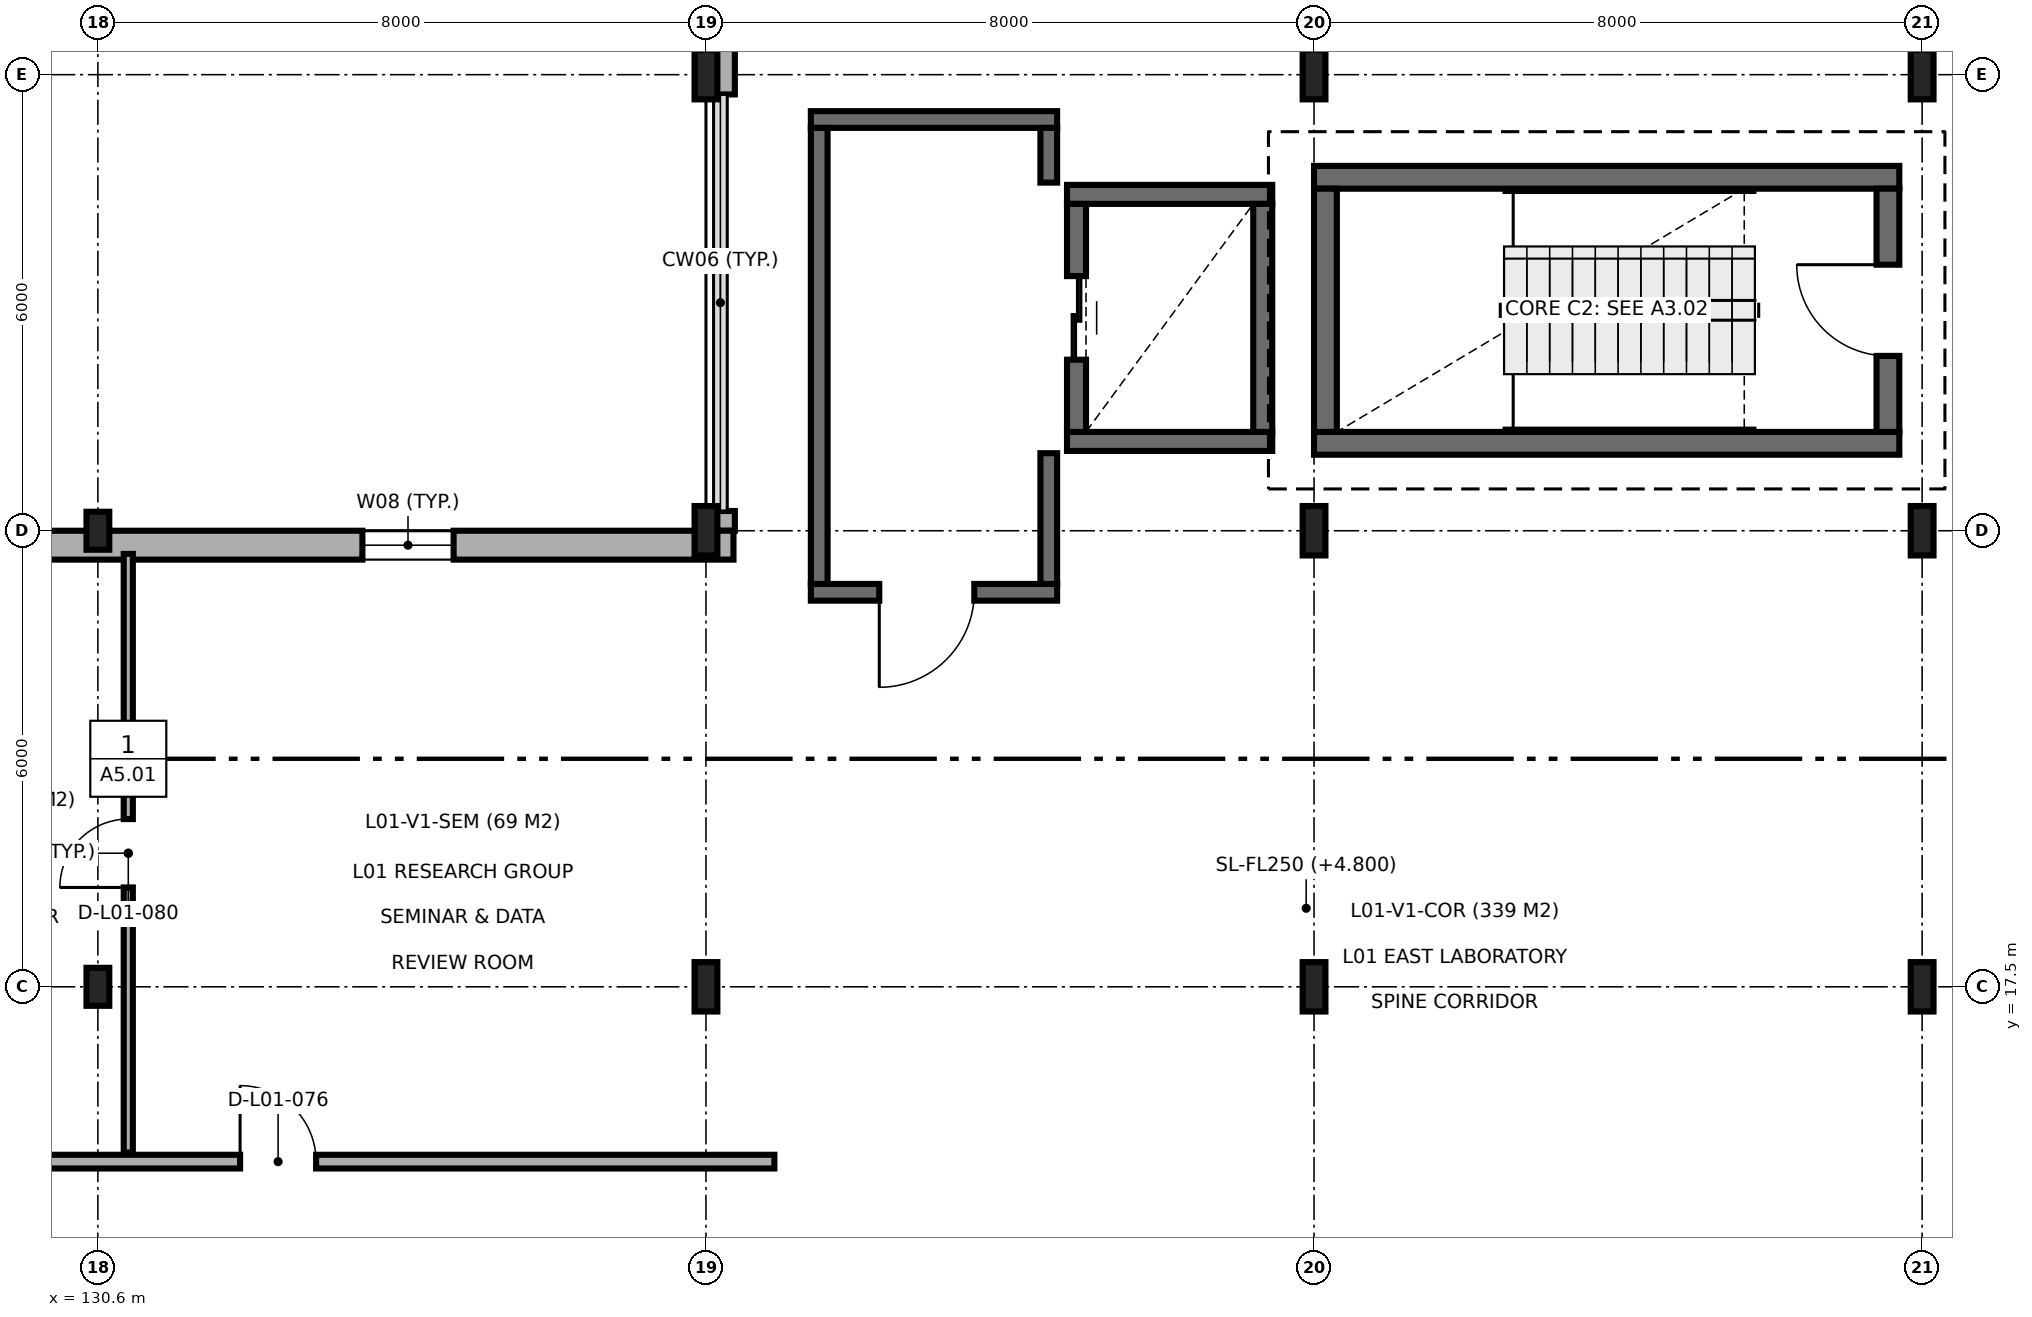
"""IFC4 building model, lengths in metres.
Left out: names, types, materials, properties, quantities, classifications, styles, units other than length and angle.
Written with IfcOpenShell. Run it as: python <this file> out.ifc"""

import sys

from ifc_helpers import new_model, si_unit, direction, frame, frame_2d, origin, origin_2d, place, context, subcontext, project, spatial, rectangle, i_section, extrude, element, fill, save


model = new_model("IFC4")
c1 = context("Model", 3, precision=1e-05, world=origin(), true_north=direction((0.0, 1.0)))
c2 = subcontext(c1, "Body", "Model", "MODEL_VIEW")
j1 = project(units=[si_unit("LENGTHUNIT", "METRE"), si_unit("PLANEANGLEUNIT", "RADIAN")], contexts=[c1])
p1 = place(None, origin())
s1 = spatial("IfcSite", under=j1, at=p1, CompositionType="ELEMENT")
p2 = place(p1, origin())
s2 = spatial("IfcBuilding", under=s1, at=p2, CompositionType="ELEMENT")
p3 = place(p2, frame((0.0, 0.0, 4.8)))
s3 = spatial("IfcBuildingStorey", under=s2, at=p3, CompositionType="ELEMENT", Elevation=4.8)
for number, where, z_axis, x_axis in (
    (1, (130.6, 17.5, 0.0), (0.0, 0.0, 1.0), (1.0, 0.0, 0.0)),
    (2, (130.6, 23.5, 0.0), (0.0, 0.0, 1.0), (1.0, 0.0, 0.0)),
):
    element("IfcColumn", number, at=place(p3, frame(where, z_axis=z_axis, x_axis=x_axis)), inside=s3, PredefinedType="COLUMN", context=c2, shape_type="SweptSolid", body=[
        extrude(i_section(OverallWidth=0.3, OverallDepth=0.5, WebThickness=0.014, FlangeThickness=0.028, FilletRadius=0.027, at=origin_2d()), origin(), (0.0, 0.0, 1.0), 4.5),
    ])
for number, where, z_axis, x_axis in (
    (3, (138.6, 17.5, 0.0), (0.0, 0.0, 1.0), (1.0, 0.0, 0.0)),
    (4, (138.6, 23.5, 0.0), (0.0, 0.0, 1.0), (1.0, 0.0, 0.0)),
    (5, (138.6, 29.5, 0.0), (0.0, 0.0, 1.0), (1.0, 0.0, 0.0)),
    (6, (146.6, 17.5, 0.0), (0.0, 0.0, 1.0), (1.0, 0.0, 0.0)),
    (7, (146.6, 23.5, 0.0), (0.0, 0.0, 1.0), (1.0, 0.0, 0.0)),
    (8, (146.6, 29.5, 0.0), (0.0, 0.0, 1.0), (1.0, 0.0, 0.0)),
    (9, (154.6, 17.5, 0.0), (0.0, 0.0, 1.0), (1.0, 0.0, 0.0)),
    (10, (154.6, 23.5, 0.0), (0.0, 0.0, 1.0), (1.0, 0.0, 0.0)),
    (11, (154.6, 29.5, 0.0), (0.0, 0.0, 1.0), (1.0, 0.0, 0.0)),
):
    element("IfcColumn", number, at=place(p3, frame(where, z_axis=z_axis, x_axis=x_axis)), inside=s3, PredefinedType="COLUMN", context=c2, shape_type="SweptSolid", body=[
        extrude(i_section(OverallWidth=0.3, OverallDepth=0.65, WebThickness=0.016, FlangeThickness=0.031, FilletRadius=0.027, at=origin_2d()), origin(), (0.0, 0.0, 1.0), 4.5),
    ])
for number, where, z_axis, x_axis in (
    (12, (146.6, 24.65, 0.0), (0.0, 0.0, 1.0), (1.0, 0.0, 0.0)),
    (13, (154.3, 28.15, 0.0), (0.0, 0.0, 1.0), (-1.0, 0.0, 0.0)),
):
    element("IfcWall", number, at=place(p3, frame(where, z_axis=z_axis, x_axis=x_axis)), inside=s3, PredefinedType="SHEAR", context=c2, shape_type="SweptSolid", body=[
        extrude(rectangle(XDim=7.7, YDim=0.3, at=frame_2d((3.85, 0.0))), origin(), (0.0, 0.0, 1.0), 4.5),
    ])
p4 = place(p3, frame((146.75, 28.0, 0.0), z_axis=(0.0, 0.0, 1.0), x_axis=(0.0, -1.0, 0.0)))
e14 = element("IfcWall", 14, at=p4, inside=s3, PredefinedType="SHEAR", context=c2, shape_type="SweptSolid", body=[
    extrude(rectangle(XDim=3.2, YDim=0.3, at=frame_2d((1.6, 0.0))), origin(), (0.0, 0.0, 1.0), 4.5),
])
p5 = place(p3, frame((154.15, 24.8, 0.0), z_axis=(0.0, 0.0, 1.0), x_axis=(0.0, 1.0, 0.0)))
e15 = element("IfcWall", 15, at=p5, inside=s3, PredefinedType="SHEAR", context=c2, shape_type="SweptSolid", body=[
    extrude(rectangle(XDim=3.2, YDim=0.3, at=frame_2d((1.6, 0.0))), origin(), (0.0, 0.0, 1.0), 4.5),
])
p6 = place(p5, frame((1.0, 0.0, 0.0)))
e16 = element("IfcOpeningElement", 16, at=p6, cuts=e15, PredefinedType="OPENING", context=c2, shape_type="SweptSolid", body=[
    extrude(rectangle(XDim=1.2, YDim=2.15, at=frame_2d((0.6, 1.075))), frame((0.0, 0.16, 0.0), z_axis=(0.0, -1.0, 0.0), x_axis=(1.0, 0.0, 0.0)), (0.0, 0.0, 1.0), 0.32),
])
for number, where, z_axis, x_axis in (
    (17, (143.35, 24.675, 0.0), (0.0, 0.0, 1.0), (1.0, 0.0, 0.0)),
    (18, (146.05, 27.925, 0.0), (0.0, 0.0, 1.0), (-1.0, 0.0, 0.0)),
):
    element("IfcWall", number, at=place(p3, frame(where, z_axis=z_axis, x_axis=x_axis)), inside=s3, PredefinedType="SHEAR", context=c2, shape_type="SweptSolid", body=[
        extrude(rectangle(XDim=2.7, YDim=0.25, at=frame_2d((1.35, 0.0))), origin(), (0.0, 0.0, 1.0), 4.5),
    ])
p7 = place(p3, frame((143.475, 27.8, 0.0), z_axis=(0.0, 0.0, 1.0), x_axis=(0.0, -1.0, 0.0)))
e19 = element("IfcWall", 19, at=p7, inside=s3, PredefinedType="SHEAR", context=c2, shape_type="SweptSolid", body=[
    extrude(rectangle(XDim=3.0, YDim=0.25, at=frame_2d((1.5, 0.0))), origin(), (0.0, 0.0, 1.0), 4.5),
])
p8 = place(p7, frame((0.95, 0.0, 0.0)))
e20 = element("IfcOpeningElement", 20, at=p8, cuts=e19, PredefinedType="OPENING", context=c2, shape_type="SweptSolid", body=[
    extrude(rectangle(XDim=1.1, YDim=2.15, at=frame_2d((0.55, 1.075))), frame((0.0, 0.135, 0.0), z_axis=(0.0, -1.0, 0.0), x_axis=(1.0, 0.0, 0.0)), (0.0, 0.0, 1.0), 0.27),
])
p9 = place(p3, frame((145.925, 24.8, 0.0), z_axis=(0.0, 0.0, 1.0), x_axis=(0.0, 1.0, 0.0)))
e21 = element("IfcWall", 21, at=p9, inside=s3, PredefinedType="SHEAR", context=c2, shape_type="SweptSolid", body=[
    extrude(rectangle(XDim=3.0, YDim=0.25, at=frame_2d((1.5, 0.0))), origin(), (0.0, 0.0, 1.0), 4.5),
])
p10 = place(p3, frame((139.98, 22.69, 0.0), z_axis=(0.0, 0.0, 1.0), x_axis=(1.0, 0.0, 0.0)))
e22 = element("IfcWall", 22, at=p10, inside=s3, PredefinedType="SOLIDWALL", context=c2, shape_type="SweptSolid", body=[
    extrude(rectangle(XDim=3.24, YDim=0.22, at=frame_2d((1.62, 0.0))), origin(), (0.0, 0.0, 1.0), 4.25),
])
p11 = place(p10, frame((0.9, 0.0, 0.0)))
e23 = element("IfcOpeningElement", 23, at=p11, cuts=e22, PredefinedType="OPENING", context=c2, shape_type="SweptSolid", body=[
    extrude(rectangle(XDim=1.25, YDim=2.15, at=frame_2d((0.625, 1.075))), frame((0.0, 0.12, 0.0), z_axis=(0.0, -1.0, 0.0), x_axis=(1.0, 0.0, 0.0)), (0.0, 0.0, 1.0), 0.24),
])
p12 = place(p3, frame((143.22, 28.91, 0.0), z_axis=(0.0, 0.0, 1.0), x_axis=(-1.0, 0.0, 0.0)))
e24 = element("IfcWall", 24, at=p12, inside=s3, PredefinedType="SOLIDWALL", context=c2, shape_type="SweptSolid", body=[
    extrude(rectangle(XDim=3.24, YDim=0.22, at=frame_2d((1.62, 0.0))), origin(), (0.0, 0.0, 1.0), 4.25),
])
p13 = place(p3, frame((140.09, 28.8, 0.0), z_axis=(0.0, 0.0, 1.0), x_axis=(0.0, -1.0, 0.0)))
e25 = element("IfcWall", 25, at=p13, inside=s3, PredefinedType="SOLIDWALL", context=c2, shape_type="SweptSolid", body=[
    extrude(rectangle(XDim=6.0, YDim=0.22, at=frame_2d((3.0, 0.0))), origin(), (0.0, 0.0, 1.0), 4.25),
])
p14 = place(p3, frame((143.11, 22.8, 0.0), z_axis=(0.0, 0.0, 1.0), x_axis=(0.0, 1.0, 0.0)))
e26 = element("IfcWall", 26, at=p14, inside=s3, PredefinedType="SOLIDWALL", context=c2, shape_type="SweptSolid", body=[
    extrude(rectangle(XDim=1.72, YDim=0.22, at=frame_2d((0.86, 0.0))), origin(), (0.0, 0.0, 1.0), 4.25),
])
p15 = place(p3, frame((143.11, 28.08, 0.0), z_axis=(0.0, 0.0, 1.0), x_axis=(0.0, 1.0, 0.0)))
e27 = element("IfcWall", 27, at=p15, inside=s3, PredefinedType="SOLIDWALL", context=c2, shape_type="SweptSolid", body=[
    extrude(rectangle(XDim=0.72, YDim=0.22, at=frame_2d((0.36, 0.0))), origin(), (0.0, 0.0, 1.0), 4.25),
])
p16 = place(p3, frame((138.79, 41.138, 0.0), z_axis=(0.0, 0.0, 1.0), x_axis=(0.0, -1.0, 0.0)))
e28 = element("IfcWall", 28, at=p16, inside=s3, PredefinedType="SOLIDWALL", context=c2, shape_type="SweptSolid", body=[
    extrude(rectangle(XDim=11.898, YDim=0.38, at=frame_2d((5.949, 0.0))), origin(), (0.0, 0.0, 1.0), 4.25),
])
p17 = place(p16, frame((7.298, 0.0, 0.9)))
e29 = element("IfcOpeningElement", 29, at=p17, cuts=e28, PredefinedType="OPENING", context=c2, shape_type="SweptSolid", body=[
    extrude(rectangle(XDim=2.7, YDim=1.8, at=frame_2d((1.35, 0.9))), frame((0.0, 0.2, 0.0), z_axis=(0.0, -1.0, 0.0), x_axis=(1.0, 0.0, 0.0)), (0.0, 0.0, 1.0), 0.4),
])
p18 = place(p3, frame((138.79, 23.76, 0.0), z_axis=(0.0, 0.0, 1.0), x_axis=(0.0, -1.0, 0.0)))
e30 = element("IfcWall", 30, at=p18, inside=s3, PredefinedType="SOLIDWALL", context=c2, shape_type="SweptSolid", body=[
    extrude(rectangle(XDim=0.26, YDim=0.38, at=frame_2d((0.13, 0.0))), origin(), (0.0, 0.0, 1.0), 4.25),
])
p19 = place(p3, frame((138.962, 23.31, 0.0), z_axis=(0.0, 0.0, 1.0), x_axis=(-1.0, 0.0, 0.0)))
e31 = element("IfcWall", 31, at=p19, inside=s3, PredefinedType="SOLIDWALL", context=c2, shape_type="SweptSolid", body=[
    extrude(rectangle(XDim=33.9, YDim=0.38, at=frame_2d((16.95, 0.0))), origin(), (0.0, 0.0, 1.0), 4.25),
])
p20 = place(p19, frame((3.682, 0.0, 0.9)))
e32 = element("IfcOpeningElement", 32, at=p20, cuts=e31, PredefinedType="OPENING", context=c2, shape_type="SweptSolid", body=[
    extrude(rectangle(XDim=1.2, YDim=2.1, at=frame_2d((0.6, 1.05))), frame((0.0, 0.2, 0.0), z_axis=(0.0, -1.0, 0.0), x_axis=(1.0, 0.0, 0.0)), (0.0, 0.0, 1.0), 0.4),
])
p21 = place(p19, frame((11.642, 0.0, 0.9)))
e33 = element("IfcOpeningElement", 33, at=p21, cuts=e31, PredefinedType="OPENING", context=c2, shape_type="SweptSolid", body=[
    extrude(rectangle(XDim=1.8, YDim=2.1, at=frame_2d((0.9, 1.05))), frame((0.0, 0.2, 0.0), z_axis=(0.0, -1.0, 0.0), x_axis=(1.0, 0.0, 0.0)), (0.0, 0.0, 1.0), 0.4),
])
p22 = place(p19, frame((17.182, 0.0, 0.9)))
e34 = element("IfcOpeningElement", 34, at=p22, cuts=e31, PredefinedType="OPENING", context=c2, shape_type="SweptSolid", body=[
    extrude(rectangle(XDim=1.8, YDim=2.1, at=frame_2d((0.9, 1.05))), frame((0.0, 0.2, 0.0), z_axis=(0.0, -1.0, 0.0), x_axis=(1.0, 0.0, 0.0)), (0.0, 0.0, 1.0), 0.4),
])
p23 = place(p19, frame((20.062, 0.0, 0.9)))
e35 = element("IfcOpeningElement", 35, at=p23, cuts=e31, PredefinedType="OPENING", context=c2, shape_type="SweptSolid", body=[
    extrude(rectangle(XDim=1.2, YDim=1.8, at=frame_2d((0.6, 0.9))), frame((0.0, 0.2, 0.0), z_axis=(0.0, -1.0, 0.0), x_axis=(1.0, 0.0, 0.0)), (0.0, 0.0, 1.0), 0.4),
])
p24 = place(p19, frame((22.192, 0.0, 0.9)))
e36 = element("IfcOpeningElement", 36, at=p24, cuts=e31, PredefinedType="OPENING", context=c2, shape_type="SweptSolid", body=[
    extrude(rectangle(XDim=1.5, YDim=1.5, at=frame_2d((0.75, 0.75))), frame((0.0, 0.2, 0.0), z_axis=(0.0, -1.0, 0.0), x_axis=(1.0, 0.0, 0.0)), (0.0, 0.0, 1.0), 0.4),
])
p25 = place(p19, frame((27.162, 0.0, 0.9)))
e37 = element("IfcOpeningElement", 37, at=p25, cuts=e31, PredefinedType="OPENING", context=c2, shape_type="SweptSolid", body=[
    extrude(rectangle(XDim=2.4, YDim=1.5, at=frame_2d((1.2, 0.75))), frame((0.0, 0.2, 0.0), z_axis=(0.0, -1.0, 0.0), x_axis=(1.0, 0.0, 0.0)), (0.0, 0.0, 1.0), 0.4),
])
p26 = place(p3, frame((105.005, 15.2, 0.0), z_axis=(0.0, 0.0, 1.0), x_axis=(1.0, 0.0, 0.0)))
e38 = element("IfcWall", 38, at=p26, inside=s3, PredefinedType="PARTITIONING", context=c2, shape_type="SweptSolid", body=[
    extrude(rectangle(XDim=34.495, YDim=0.18, at=frame_2d((17.248, 0.0))), origin(), (0.0, 0.0, 1.0), 4.25),
])
p27 = place(p26, frame((7.391, 0.0, 0.0)))
e39 = element("IfcOpeningElement", 39, at=p27, cuts=e38, PredefinedType="OPENING", context=c2, shape_type="SweptSolid", body=[
    extrude(rectangle(XDim=0.9, YDim=2.1, at=frame_2d((0.45, 1.05))), frame((0.0, 0.1, 0.0), z_axis=(0.0, -1.0, 0.0), x_axis=(1.0, 0.0, 0.0)), (0.0, 0.0, 1.0), 0.2),
])
p28 = place(p26, frame((18.45, 0.0, 0.0)))
e40 = element("IfcOpeningElement", 40, at=p28, cuts=e38, PredefinedType="OPENING", context=c2, shape_type="SweptSolid", body=[
    extrude(rectangle(XDim=0.95, YDim=2.1, at=frame_2d((0.475, 1.05))), frame((0.0, 0.1, 0.0), z_axis=(0.0, -1.0, 0.0), x_axis=(1.0, 0.0, 0.0)), (0.0, 0.0, 1.0), 0.2),
])
p29 = place(p26, frame((27.466, 0.0, 0.0)))
e41 = element("IfcOpeningElement", 41, at=p29, cuts=e38, PredefinedType="OPENING", context=c2, shape_type="SweptSolid", body=[
    extrude(rectangle(XDim=1.0, YDim=2.15, at=frame_2d((0.5, 1.075))), frame((0.0, 0.1, 0.0), z_axis=(0.0, -1.0, 0.0), x_axis=(1.0, 0.0, 0.0)), (0.0, 0.0, 1.0), 0.2),
])
p30 = place(p3, frame((131.0, 15.32, 0.0), z_axis=(0.0, 0.0, 1.0), x_axis=(0.0, 1.0, 0.0)))
e42 = element("IfcWall", 42, at=p30, inside=s3, PredefinedType="PARTITIONING", context=c2, shape_type="SweptSolid", body=[
    extrude(rectangle(XDim=7.875, YDim=0.12, at=frame_2d((3.938, 0.0))), origin(), (0.0, 0.0, 1.0), 4.25),
])
p31 = place(p30, frame((3.487, 0.0, 0.0)))
e43 = element("IfcOpeningElement", 43, at=p31, cuts=e42, PredefinedType="OPENING", context=c2, shape_type="SweptSolid", body=[
    extrude(rectangle(XDim=0.9, YDim=2.1, at=frame_2d((0.45, 1.05))), frame((0.0, 0.07, 0.0), z_axis=(0.0, -1.0, 0.0), x_axis=(1.0, 0.0, 0.0)), (0.0, 0.0, 1.0), 0.14),
])
p32 = place(p6, origin())
e44 = element("IfcDoor", 44, at=p32, inside=s3, OperationType="SINGLE_SWING_RIGHT", PredefinedType="DOOR", context=c2, shape_type="SweptSolid", body=[
    extrude(rectangle(XDim=1.2, YDim=2.15, at=frame_2d((0.6, 1.075))), frame((0.0, 0.025, 0.0), z_axis=(0.0, -1.0, 0.0), x_axis=(1.0, 0.0, 0.0)), (0.0, 0.0, 1.0), 0.05),
])
fill(e16, e44)
p33 = place(p8, origin())
e45 = element("IfcDoor", 45, at=p33, inside=s3, OperationType="DOUBLE_DOOR_SLIDING", PredefinedType="DOOR", context=c2, shape_type="SweptSolid", body=[
    extrude(rectangle(XDim=1.1, YDim=2.15, at=frame_2d((0.55, 1.075))), frame((0.0, 0.025, 0.0), z_axis=(0.0, -1.0, 0.0), x_axis=(1.0, 0.0, 0.0)), (0.0, 0.0, 1.0), 0.05),
])
fill(e20, e45)
p34 = place(p11, frame((1.25, 0.0, 0.0), z_axis=(0.0, 0.0, 1.0), x_axis=(-1.0, 0.0, 0.0)))
e46 = element("IfcDoor", 46, at=p34, inside=s3, OperationType="SINGLE_SWING_LEFT", PredefinedType="DOOR", context=c2, shape_type="SweptSolid", body=[
    extrude(rectangle(XDim=1.25, YDim=2.15, at=frame_2d((0.625, 1.075))), frame((0.0, 0.025, 0.0), z_axis=(0.0, -1.0, 0.0), x_axis=(1.0, 0.0, 0.0)), (0.0, 0.0, 1.0), 0.05),
])
fill(e23, e46)
p35 = place(p20, origin())
e47 = element("IfcWindow", 47, at=p35, inside=s3, PartitioningType="SINGLE_PANEL", PredefinedType="WINDOW", context=c2, shape_type="SweptSolid", body=[
    extrude(rectangle(XDim=1.2, YDim=2.1, at=frame_2d((0.6, 1.05))), frame((0.0, 0.03, 0.0), z_axis=(0.0, -1.0, 0.0), x_axis=(1.0, 0.0, 0.0)), (0.0, 0.0, 1.0), 0.06),
])
fill(e32, e47)
p36 = place(p29, origin())
e48 = element("IfcDoor", 48, at=p36, inside=s3, OperationType="SINGLE_SWING_LEFT", PredefinedType="DOOR", context=c2, shape_type="SweptSolid", body=[
    extrude(rectangle(XDim=1.0, YDim=2.15, at=frame_2d((0.5, 1.075))), frame((0.0, 0.025, 0.0), z_axis=(0.0, -1.0, 0.0), x_axis=(1.0, 0.0, 0.0)), (0.0, 0.0, 1.0), 0.05),
])
fill(e41, e48)
p37 = place(p31, origin())
e49 = element("IfcDoor", 49, at=p37, inside=s3, OperationType="SINGLE_SWING_LEFT", PredefinedType="DOOR", context=c2, shape_type="SweptSolid", body=[
    extrude(rectangle(XDim=0.9, YDim=2.1, at=frame_2d((0.45, 1.05))), frame((0.0, 0.025, 0.0), z_axis=(0.0, -1.0, 0.0), x_axis=(1.0, 0.0, 0.0)), (0.0, 0.0, 1.0), 0.05),
])
fill(e43, e49)
save(model, sys.argv[1])
